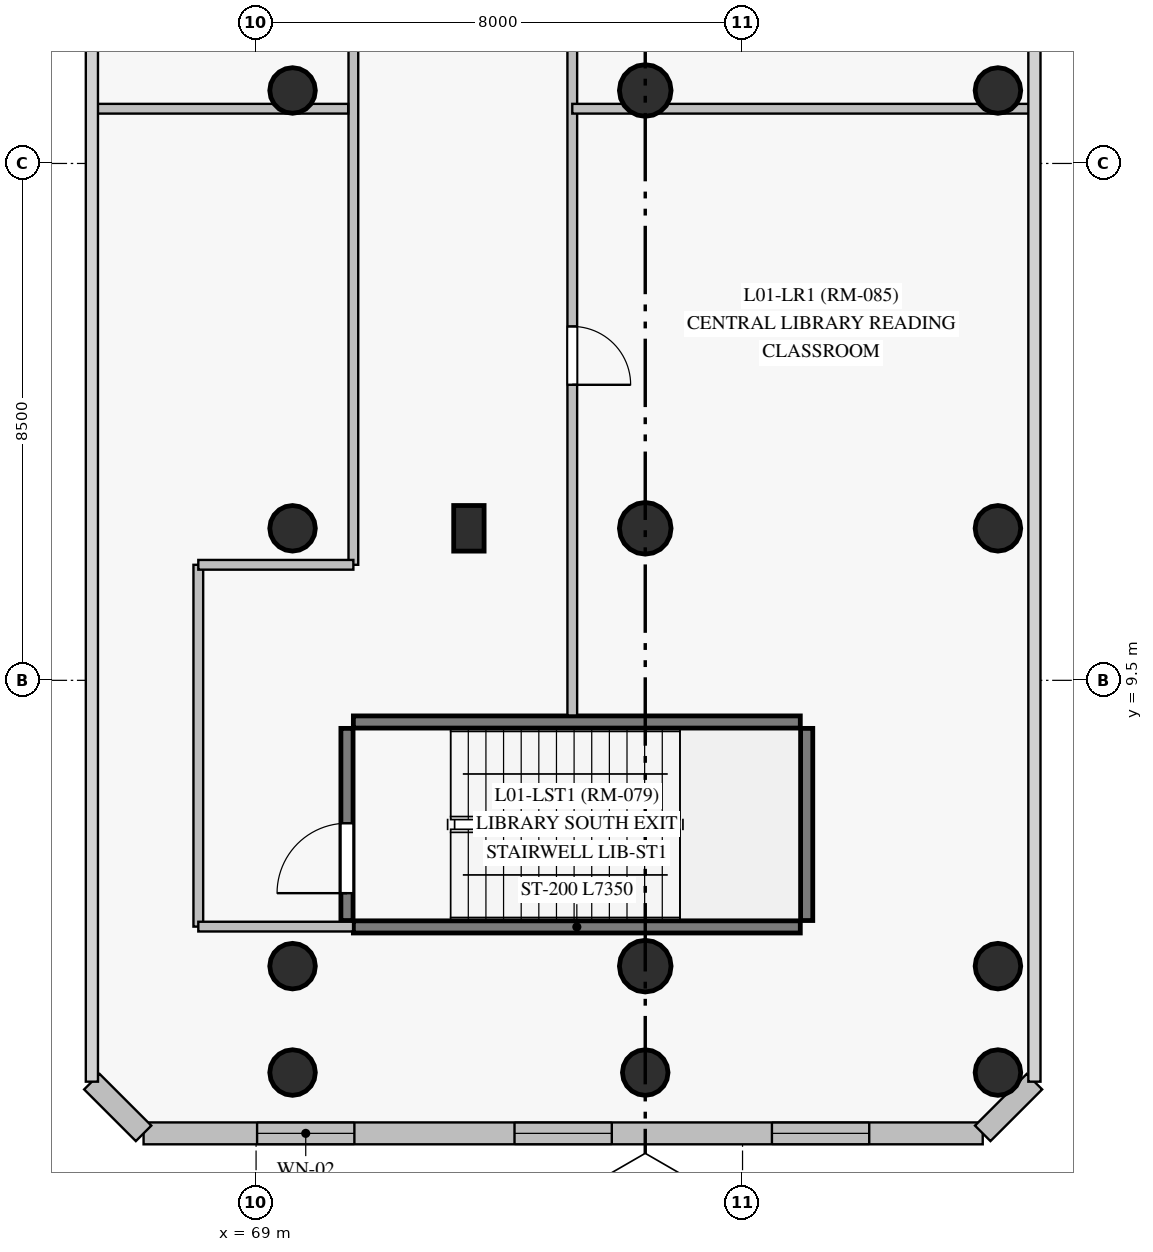
"""IFC4 building model, lengths in metres.
Left out: names, types, materials, properties, quantities, classifications, styles, units other than length and angle.
Written with IfcOpenShell. Run it as: python <this file> out.ifc"""

import sys

from ifc_helpers import new_model, si_unit, direction, frame, frame_2d, origin, origin_with_axes, origin_2d, place, context, subcontext, project, spatial, rectangle, circle, extrude, source, transform, mapped, element, fill, save


model = new_model("IFC4")
c1 = context("Model", 3, precision=1e-05, world=origin(), true_north=direction((0.0, 1.0)))
c2 = subcontext(c1, "Body", "Model", "MODEL_VIEW")
j1 = project(units=[si_unit("LENGTHUNIT", "METRE"), si_unit("PLANEANGLEUNIT", "RADIAN")], contexts=[c1])
p1 = place(None, origin())
s1 = spatial("IfcSite", under=j1, at=p1, CompositionType="ELEMENT")
p2 = place(p1, origin())
s2 = spatial("IfcBuilding", under=s1, at=p2, CompositionType="ELEMENT")
p3 = place(p2, frame((0.0, 0.0, 4.5)))
s3 = spatial("IfcBuildingStorey", under=s2, at=p3, CompositionType="ELEMENT", Elevation=4.5)
m1 = source(origin_with_axes(), c2, "Body", "SweptSolid", [
    extrude(circle(Radius=0.375, at=origin_2d()), origin(), (0.0, 0.0, 1.0), 4.5),
])
for number, where, z_axis, x_axis in (
    (1, (69.6, 3.05, 0.0), (0.0, 0.0, 1.0), (1.0, 0.0, 0.0)),
    (2, (75.4, 3.05, 0.0), (0.0, 0.0, 1.0), (1.0, 0.0, 0.0)),
    (3, (81.2, 3.05, 0.0), (0.0, 0.0, 1.0), (1.0, 0.0, 0.0)),
    (4, (69.6, 4.8, 0.0), (0.0, 0.0, 1.0), (1.0, 0.0, 0.0)),
    (5, (69.6, 12.0, 0.0), (0.0, 0.0, 1.0), (1.0, 0.0, 0.0)),
    (6, (69.6, 19.2, 0.0), (0.0, 0.0, 1.0), (1.0, 0.0, 0.0)),
):
    element("IfcColumn", number, at=place(p3, frame(where, z_axis=z_axis, x_axis=x_axis)), inside=s3, PredefinedType="COLUMN", context=c2, shape_type="MappedRepresentation", body=[
        mapped(m1, transform((0.0, 0.0, 0.0), scale=1.0)),
    ])
m2 = source(origin_with_axes(), c2, "Body", "SweptSolid", [
    extrude(circle(Radius=0.425, at=origin_2d()), origin(), (0.0, 0.0, 1.0), 4.5),
])
for number, where, z_axis, x_axis in (
    (7, (75.4, 4.8, 0.0), (0.0, 0.0, 1.0), (1.0, 0.0, 0.0)),
    (8, (75.4, 12.0, 0.0), (0.0, 0.0, 1.0), (1.0, 0.0, 0.0)),
    (9, (75.4, 19.2, 0.0), (0.0, 0.0, 1.0), (1.0, 0.0, 0.0)),
):
    element("IfcColumn", number, at=place(p3, frame(where, z_axis=z_axis, x_axis=x_axis)), inside=s3, PredefinedType="COLUMN", context=c2, shape_type="MappedRepresentation", body=[
        mapped(m2, transform((0.0, 0.0, 0.0), scale=1.0)),
    ])
for number, where, z_axis, x_axis in (
    (10, (81.2, 4.8, 0.0), (0.0, 0.0, 1.0), (1.0, 0.0, 0.0)),
    (11, (81.2, 12.0, 0.0), (0.0, 0.0, 1.0), (1.0, 0.0, 0.0)),
    (12, (81.2, 19.2, 0.0), (0.0, 0.0, 1.0), (1.0, 0.0, 0.0)),
):
    element("IfcColumn", number, at=place(p3, frame(where, z_axis=z_axis, x_axis=x_axis)), inside=s3, PredefinedType="COLUMN", context=c2, shape_type="MappedRepresentation", body=[
        mapped(m1, transform((0.0, 0.0, 0.0), scale=1.0)),
    ])
m3 = source(origin_with_axes(), c2, "Body", "SweptSolid", [
    extrude(rectangle(XDim=0.5, YDim=0.75, at=origin_2d()), origin(), (0.0, 0.0, 1.0), 4.5),
])
p4 = place(p3, frame((72.5, 12.0, 0.0), z_axis=(0.0, 0.0, 1.0), x_axis=(1.0, 0.0, 0.0)))
e13 = element("IfcColumn", 13, at=p4, inside=s3, PredefinedType="PILASTER", context=c2, shape_type="MappedRepresentation", body=[
    mapped(m3, transform((0.0, 0.0, 0.0), scale=1.0)),
])
p5 = place(p3, frame((67.15, 2.05, 0.0), z_axis=(0.0, 0.0, 1.0), x_axis=(1.0, 0.0, 0.0)))
e14 = element("IfcWall", 14, at=p5, inside=s3, PredefinedType="SOLIDWALL", context=c2, shape_type="SweptSolid", body=[
    extrude(rectangle(XDim=13.8, YDim=0.36, at=frame_2d((6.9, 0.0))), origin(), (0.0, 0.0, 1.0), 4.2),
])
p6 = place(p5, frame((1.867, 0.0, 0.85)))
e15 = element("IfcOpeningElement", 15, at=p6, cuts=e14, PredefinedType="OPENING", context=c2, shape_type="SweptSolid", body=[
    extrude(rectangle(XDim=1.6, YDim=2.2, at=frame_2d((0.8, 1.1))), frame((0.0, 0.19, 0.0), z_axis=(0.0, -1.0, 0.0), x_axis=(1.0, 0.0, 0.0)), (0.0, 0.0, 1.0), 0.38),
])
p7 = place(p5, frame((6.1, 0.0, 0.85)))
e16 = element("IfcOpeningElement", 16, at=p7, cuts=e14, PredefinedType="OPENING", context=c2, shape_type="SweptSolid", body=[
    extrude(rectangle(XDim=1.6, YDim=2.2, at=frame_2d((0.8, 1.1))), frame((0.0, 0.19, 0.0), z_axis=(0.0, -1.0, 0.0), x_axis=(1.0, 0.0, 0.0)), (0.0, 0.0, 1.0), 0.38),
])
p8 = place(p5, frame((10.333, 0.0, 0.85)))
e17 = element("IfcOpeningElement", 17, at=p8, cuts=e14, PredefinedType="OPENING", context=c2, shape_type="SweptSolid", body=[
    extrude(rectangle(XDim=1.6, YDim=2.2, at=frame_2d((0.8, 1.1))), frame((0.0, 0.19, 0.0), z_axis=(0.0, -1.0, 0.0), x_axis=(1.0, 0.0, 0.0)), (0.0, 0.0, 1.0), 0.38),
])
p9 = place(p3, frame((80.95, 2.05, 0.0), z_axis=(0.0, 0.0, 1.0), x_axis=(0.707208325923, 0.707005221866, 0.0)))
e18 = element("IfcWall", 18, at=p9, inside=s3, PredefinedType="SOLIDWALL", context=c2, shape_type="SweptSolid", body=[
    extrude(rectangle(XDim=1.202, YDim=0.36, at=frame_2d((0.601, 0.0))), origin(), (0.0, 0.0, 1.0), 4.2),
])
p10 = place(p3, frame((66.3, 2.9, 0.0), z_axis=(0.0, 0.0, 1.0), x_axis=(0.707106781187, -0.707106781187, 0.0)))
e19 = element("IfcWall", 19, at=p10, inside=s3, PredefinedType="SOLIDWALL", context=c2, shape_type="SweptSolid", body=[
    extrude(rectangle(XDim=1.202, YDim=0.36, at=frame_2d((0.601, 0.0))), origin(), (0.0, 0.0, 1.0), 4.2),
])
for number, where, z_axis, x_axis in (
    (20, (70.6, 5.445, 0.0), (0.0, 0.0, 1.0), (1.0, 0.0, 0.0)),
    (21, (70.6, 8.815, 0.0), (0.0, 0.0, 1.0), (1.0, 0.0, 0.0)),
):
    element("IfcWall", number, at=place(p3, frame(where, z_axis=z_axis, x_axis=x_axis)), inside=s3, PredefinedType="SHEAR", context=c2, shape_type="SweptSolid", body=[
        extrude(rectangle(XDim=7.35, YDim=0.2, at=frame_2d((3.675, 0.0))), origin(), (0.0, 0.0, 1.0), 4.2),
    ])
p11 = place(p3, frame((70.495, 5.55, 0.0), z_axis=(0.0, 0.0, 1.0), x_axis=(0.0, 1.0, 0.0)))
e22 = element("IfcWall", 22, at=p11, inside=s3, PredefinedType="SHEAR", context=c2, shape_type="SweptSolid", body=[
    extrude(rectangle(XDim=3.16, YDim=0.2, at=frame_2d((1.58, 0.0))), origin(), (0.0, 0.0, 1.0), 4.2),
])
p12 = place(p11, frame((0.45, 0.0, 0.0)))
e23 = element("IfcOpeningElement", 23, at=p12, cuts=e22, PredefinedType="OPENING", context=c2, shape_type="SweptSolid", body=[
    extrude(rectangle(XDim=1.15, YDim=2.15, at=frame_2d((0.575, 1.075))), frame((0.0, 0.11, 0.0), z_axis=(0.0, -1.0, 0.0), x_axis=(1.0, 0.0, 0.0)), (0.0, 0.0, 1.0), 0.22),
])
p13 = place(p3, frame((78.055, 5.55, 0.0), z_axis=(0.0, 0.0, 1.0), x_axis=(0.0, 1.0, 0.0)))
e24 = element("IfcWall", 24, at=p13, inside=s3, PredefinedType="SHEAR", context=c2, shape_type="SweptSolid", body=[
    extrude(rectangle(XDim=3.16, YDim=0.2, at=frame_2d((1.58, 0.0))), origin(), (0.0, 0.0, 1.0), 4.2),
])
p14 = place(p3, frame((70.6, 11.4, 0.0), z_axis=(0.0, 0.0, 1.0), x_axis=(0.0, 1.0, 0.0)))
e25 = element("IfcWall", 25, at=p14, inside=s3, PredefinedType="PARTITIONING", context=c2, shape_type="SweptSolid", body=[
    extrude(rectangle(XDim=30.2, YDim=0.16, at=frame_2d((15.1, 0.0))), origin(), (0.0, 0.0, 1.0), 4.2),
])
p15 = place(p3, frame((74.2, 20.6, 0.0), z_axis=(0.0, 0.0, 1.0), x_axis=(0.0, -1.0, 0.0)))
e26 = element("IfcWall", 26, at=p15, inside=s3, PredefinedType="PARTITIONING", context=c2, shape_type="SweptSolid", body=[
    extrude(rectangle(XDim=11.678, YDim=0.16, at=frame_2d((5.839, 0.0))), origin(), (0.0, 0.0, 1.0), 4.2),
])
p16 = place(p15, frame((5.28, 0.0, 0.0)))
e27 = element("IfcOpeningElement", 27, at=p16, cuts=e26, PredefinedType="OPENING", context=c2, shape_type="SweptSolid", body=[
    extrude(rectangle(XDim=0.96, YDim=2.15, at=frame_2d((0.48, 1.075))), frame((0.0, 0.09, 0.0), z_axis=(0.0, -1.0, 0.0), x_axis=(1.0, 0.0, 0.0)), (0.0, 0.0, 1.0), 0.18),
])
p17 = place(p3, frame((74.2, 18.9, 0.0), z_axis=(0.0, 0.0, 1.0), x_axis=(1.0, 0.0, 0.0)))
e28 = element("IfcWall", 28, at=p17, inside=s3, PredefinedType="PARTITIONING", context=c2, shape_type="SweptSolid", body=[
    extrude(rectangle(XDim=7.545, YDim=0.16, at=frame_2d((3.772, 0.0))), origin(), (0.0, 0.0, 1.0), 3.55),
])
p18 = place(p3, frame((68.05, 5.45, 0.0), z_axis=(0.0, 0.0, 1.0), x_axis=(0.0, 1.0, 0.0)))
e29 = element("IfcWall", 29, at=p18, inside=s3, PredefinedType="PARTITIONING", context=c2, shape_type="SweptSolid", body=[
    extrude(rectangle(XDim=5.95, YDim=0.16, at=frame_2d((2.975, 0.0))), origin(), (0.0, 0.0, 1.0), 4.2),
])
p19 = place(p3, frame((66.355, 18.9, 0.0), z_axis=(0.0, 0.0, 1.0), x_axis=(1.0, 0.0, 0.0)))
e30 = element("IfcWall", 30, at=p19, inside=s3, PredefinedType="PARTITIONING", context=c2, shape_type="SweptSolid", body=[
    extrude(rectangle(XDim=4.16, YDim=0.16, at=frame_2d((2.08, 0.0))), origin(), (0.0, 0.0, 1.0), 3.55),
])
p20 = place(p3, frame((68.05, 11.4, 0.0), z_axis=(0.0, 0.0, 1.0), x_axis=(1.0, 0.0, 0.0)))
e31 = element("IfcWall", 31, at=p20, inside=s3, PredefinedType="PARTITIONING", context=c2, shape_type="SweptSolid", body=[
    extrude(rectangle(XDim=2.55, YDim=0.16, at=frame_2d((1.275, 0.0))), origin(), (0.0, 0.0, 1.0), 3.55),
])
p21 = place(p3, frame((70.595, 5.45, 0.0), z_axis=(0.0, 0.0, 1.0), x_axis=(-1.0, 0.0, 0.0)))
e32 = element("IfcWall", 32, at=p21, inside=s3, PredefinedType="PARTITIONING", context=c2, shape_type="SweptSolid", body=[
    extrude(rectangle(XDim=2.545, YDim=0.16, at=frame_2d((1.272, 0.0))), origin(), (0.0, 0.0, 1.0), 3.55),
])
m4 = source(origin_with_axes(), c2, "Body", "SweptSolid", [
    extrude(rectangle(XDim=1.6, YDim=2.2, at=frame_2d((0.8, 1.1))), frame((0.0, 0.03, 0.0), z_axis=(0.0, -1.0, 0.0), x_axis=(1.0, 0.0, 0.0)), (0.0, 0.0, 1.0), 0.06),
])
p22 = place(p6, origin())
e33 = element("IfcWindow", 33, at=p22, inside=s3, PartitioningType="SINGLE_PANEL", PredefinedType="WINDOW", context=c2, shape_type="MappedRepresentation", body=[
    mapped(m4, transform((0.0, 0.0, 0.0), scale=1.0)),
])
fill(e15, e33)
p23 = place(p7, origin())
e34 = element("IfcWindow", 34, at=p23, inside=s3, PartitioningType="SINGLE_PANEL", PredefinedType="WINDOW", context=c2, shape_type="MappedRepresentation", body=[
    mapped(m4, transform((0.0, 0.0, 0.0), scale=1.0)),
])
fill(e16, e34)
p24 = place(p8, origin())
e35 = element("IfcWindow", 35, at=p24, inside=s3, PartitioningType="SINGLE_PANEL", PredefinedType="WINDOW", context=c2, shape_type="MappedRepresentation", body=[
    mapped(m4, transform((0.0, 0.0, 0.0), scale=1.0)),
])
fill(e17, e35)
m5 = source(origin_with_axes(), c2, "Body", "SweptSolid", [
    extrude(rectangle(XDim=1.15, YDim=2.15, at=frame_2d((0.575, 1.075))), frame((0.0, 0.025, 0.0), z_axis=(0.0, -1.0, 0.0), x_axis=(1.0, 0.0, 0.0)), (0.0, 0.0, 1.0), 0.05),
])
p25 = place(p12, origin())
e36 = element("IfcDoor", 36, at=p25, inside=s3, OperationType="SINGLE_SWING_LEFT", PredefinedType="DOOR", context=c2, shape_type="MappedRepresentation", body=[
    mapped(m5, transform((0.0, 0.0, 0.0), scale=1.0)),
])
fill(e23, e36)
m6 = source(origin_with_axes(), c2, "Body", "SweptSolid", [
    extrude(rectangle(XDim=0.96, YDim=2.15, at=frame_2d((0.48, 1.075))), frame((0.0, 0.025, 0.0), z_axis=(0.0, -1.0, 0.0), x_axis=(1.0, 0.0, 0.0)), (0.0, 0.0, 1.0), 0.05),
])
p26 = place(p16, origin())
e37 = element("IfcDoor", 37, at=p26, inside=s3, OperationType="SINGLE_SWING_RIGHT", PredefinedType="DOOR", context=c2, shape_type="MappedRepresentation", body=[
    mapped(m6, transform((0.0, 0.0, 0.0), scale=1.0)),
])
fill(e27, e37)
save(model, sys.argv[1])
